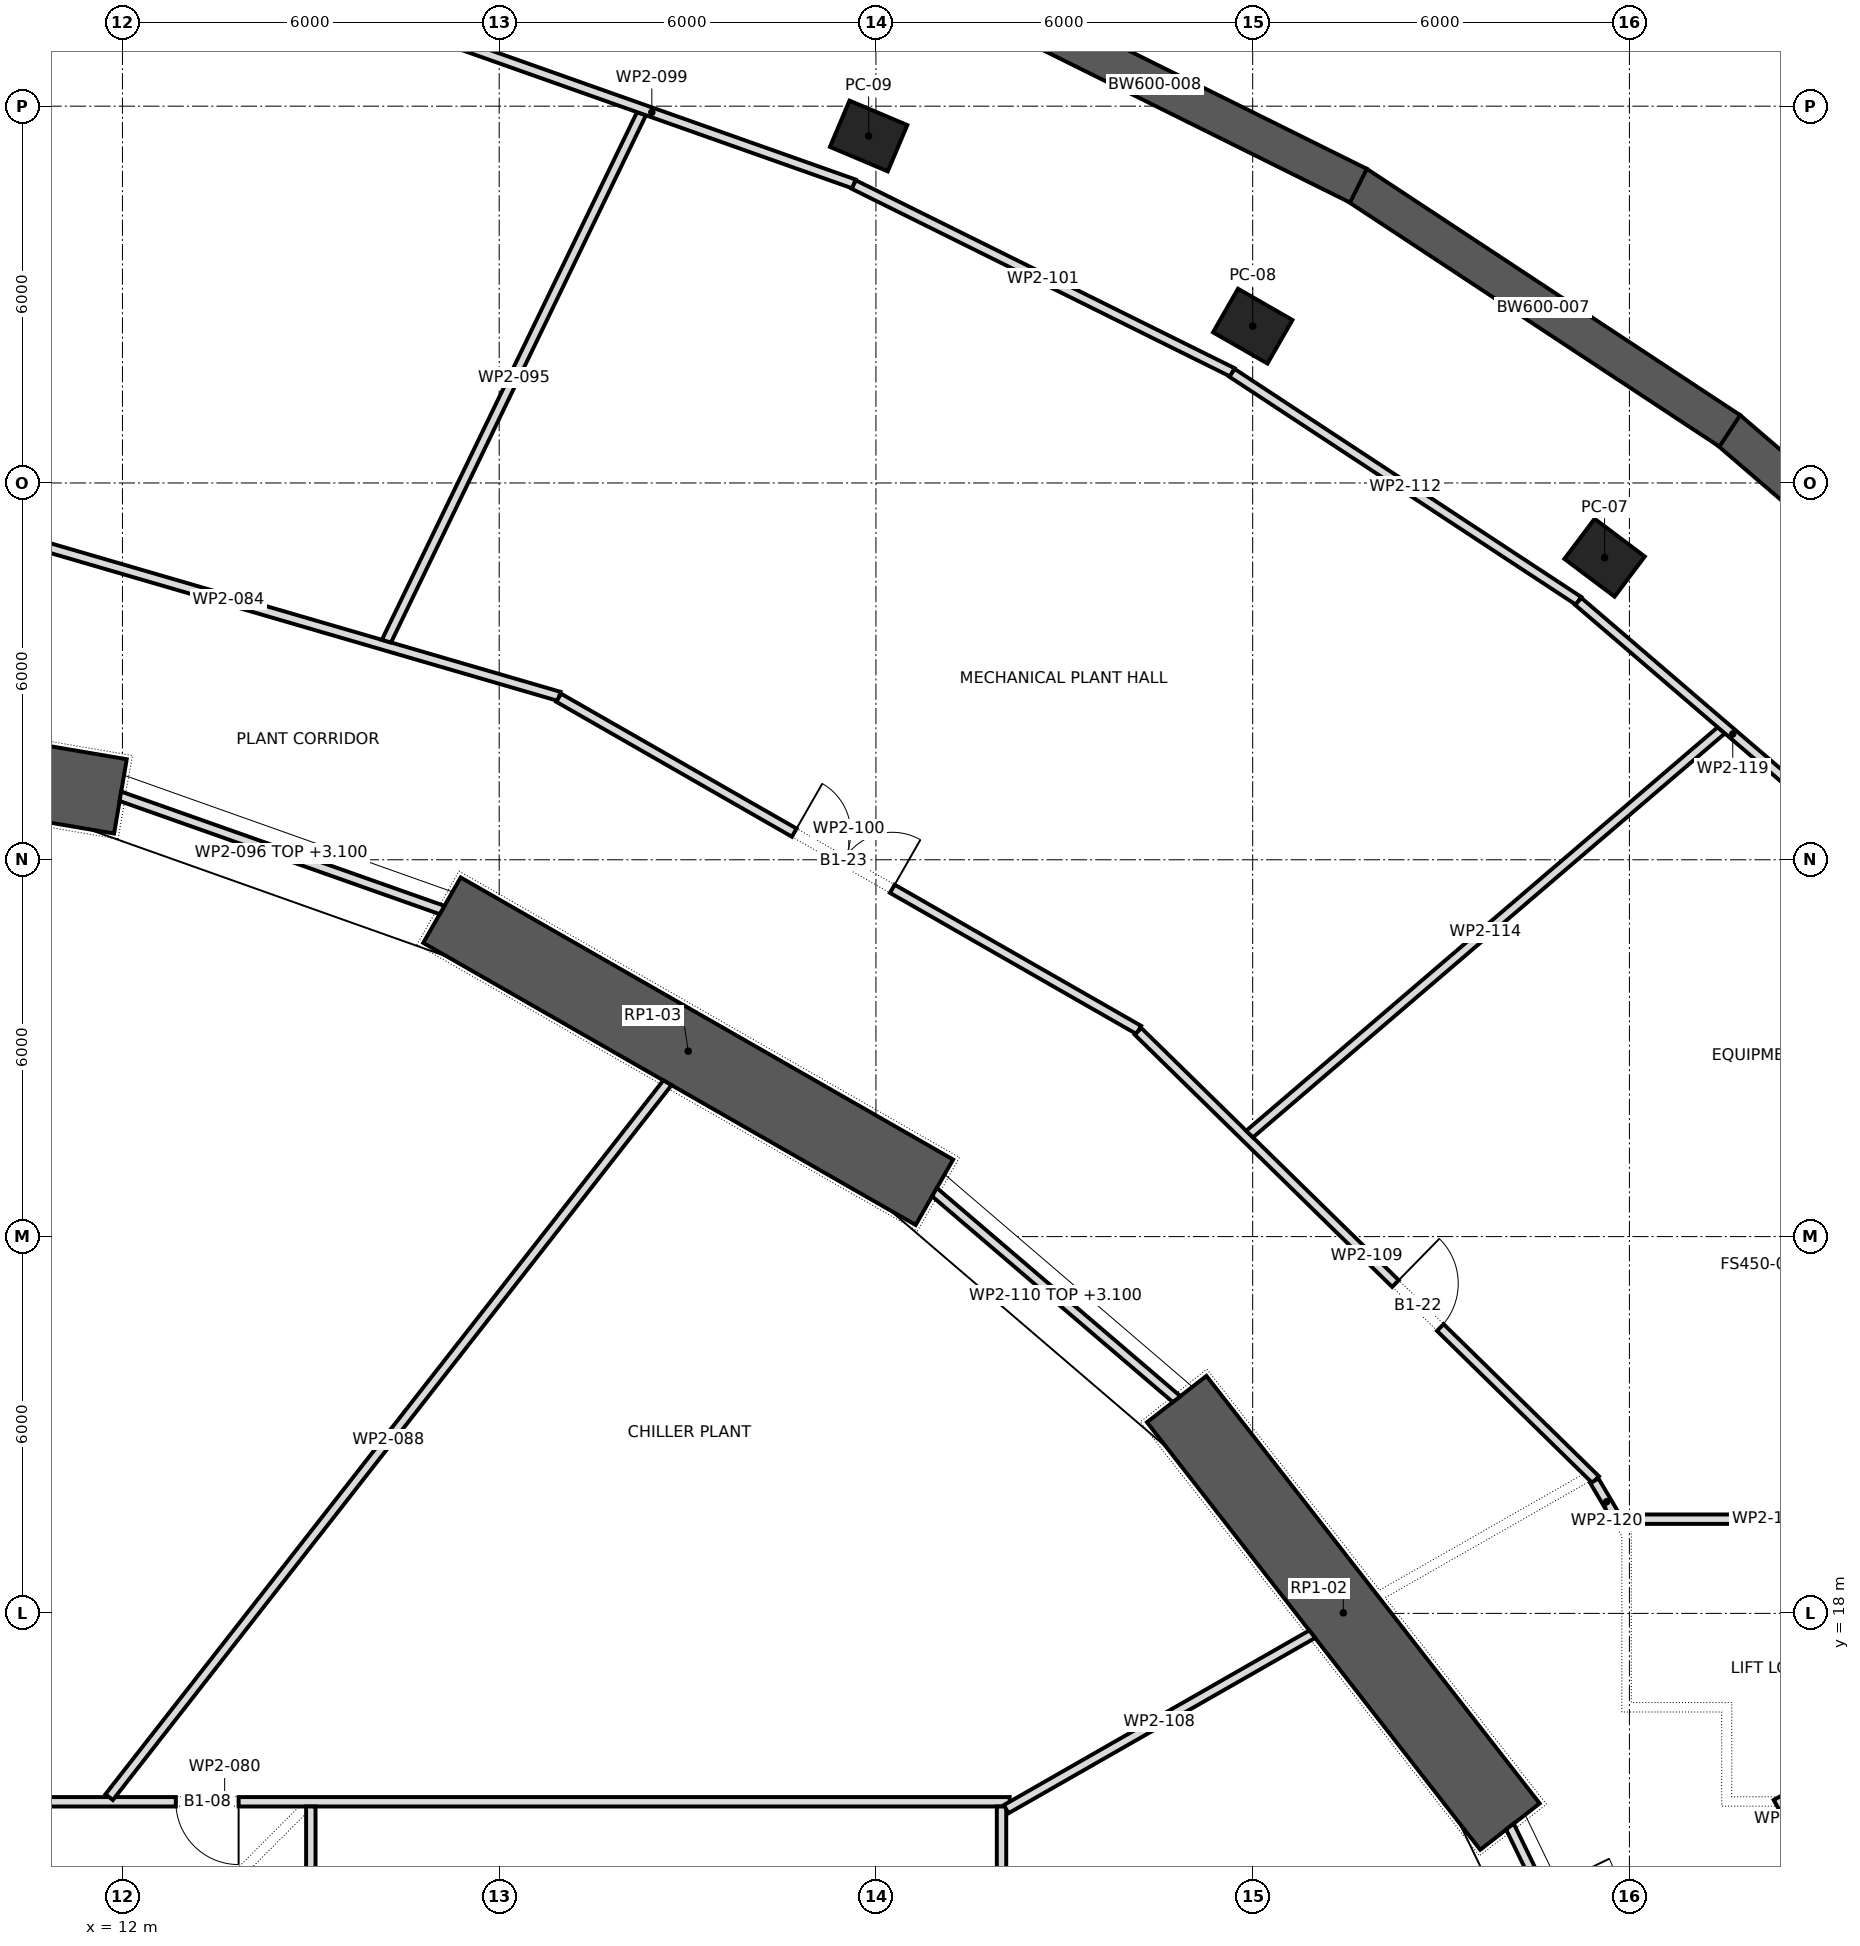
"""IFC4 building model, lengths in metres.
Left out: names, types, materials, properties, quantities, classifications, styles, units other than length and angle.
Written with IfcOpenShell. Run it as: python <this file> out.ifc"""

import sys

from ifc_helpers import new_model, si_unit, direction, frame, frame_2d, origin, origin_2d, place, context, subcontext, project, spatial, polyline, rectangle, outline, extrude, element, fill, save


model = new_model("IFC4")
c1 = context("Model", 3, precision=1e-05, world=origin(), true_north=direction((0.0, 1.0)))
c2 = subcontext(c1, "Body", "Model", "MODEL_VIEW")
j1 = project(units=[si_unit("LENGTHUNIT", "METRE"), si_unit("PLANEANGLEUNIT", "RADIAN")], contexts=[c1])
p1 = place(None, origin())
s1 = spatial("IfcSite", under=j1, at=p1, CompositionType="ELEMENT")
p2 = place(p1, origin())
s2 = spatial("IfcBuilding", under=s1, at=p2, CompositionType="ELEMENT")
p3 = place(p2, frame((0.0, 0.0, -4.0)))
s3 = spatial("IfcBuildingStorey", under=s2, at=p3, CompositionType="ELEMENT", Elevation=-4.0)
for number, where, z_axis, x_axis in (
    (1, (35.605, 34.81, 0.0), (0.0, 0.0, 1.0), (-0.799, 0.601, 0.0)),
    (2, (30.001, 38.497, 0.0), (0.0, 0.0, 1.0), (-0.868, 0.497, 0.0)),
    (3, (23.884, 41.525, 0.0), (0.0, 0.0, 1.0), (-0.921, 0.389, 0.0)),
):
    element("IfcColumn", number, at=place(p3, frame(where, z_axis=z_axis, x_axis=x_axis)), inside=s3, PredefinedType="COLUMN", context=c2, shape_type="SweptSolid", body=[
        extrude(rectangle(XDim=1.0, YDim=0.8, at=origin_2d()), origin(), (0.0, 0.0, 1.0), 4.0),
    ])
p4 = place(p3, frame((34.097, 14.605, 0.0), z_axis=(0.0, 0.0, 1.0), x_axis=(-0.614825322247, 0.788663314174, 0.0)))
e4 = element("IfcWall", 4, at=p4, inside=s3, PredefinedType="SHEAR", context=c2, shape_type="SweptSolid", body=[
    extrude(rectangle(XDim=8.632, YDim=1.2, at=frame_2d((4.316, 0.0))), origin(), (0.0, 0.0, 1.0), 4.0),
])
p5 = place(p3, frame((24.931, 24.706, 0.0), z_axis=(0.0, 0.0, 1.0), x_axis=(-0.867760656864, 0.496982336103, 0.0)))
e5 = element("IfcWall", 5, at=p5, inside=s3, PredefinedType="SHEAR", context=c2, shape_type="SweptSolid", body=[
    extrude(rectangle(XDim=9.038, YDim=1.2, at=frame_2d((4.519, 0.0))), origin(), (0.0, 0.0, 1.0), 4.0),
])
p6 = place(p3, frame((11.967, 31.009, 0.0), z_axis=(0.0, 0.0, 1.0), x_axis=(-0.985776286846, 0.168062822456, 0.0)))
e6 = element("IfcWall", 6, at=p6, inside=s3, PredefinedType="SHEAR", context=c2, shape_type="SweptSolid", body=[
    extrude(rectangle(XDim=9.312, YDim=1.2, at=frame_2d((4.656, 0.0))), origin(), (0.0, 0.0, 1.0), 4.0),
])
p7 = place(p3, frame((42.87, 32.295, 0.0), z_axis=(0.0, 0.0, 1.0), x_axis=(-0.758319142722, 0.65188348482, 0.0)))
e7 = element("IfcWall", 7, at=p7, inside=s3, PredefinedType="SOLIDWALL", context=c2, shape_type="SweptSolid", body=[
    extrude(rectangle(XDim=6.991, YDim=0.6, at=frame_2d((3.496, 0.0))), origin(), (0.0, 0.0, 1.0), 4.0),
])
p8 = place(p3, frame((37.599, 36.83, 0.0), z_axis=(0.0, 0.0, 1.0), x_axis=(-0.834745196239, 0.550636411215, 0.0)))
e8 = element("IfcWall", 8, at=p8, inside=s3, PredefinedType="SOLIDWALL", context=c2, shape_type="SweptSolid", body=[
    extrude(rectangle(XDim=7.124, YDim=0.6, at=frame_2d((3.562, 0.0))), origin(), (0.0, 0.0, 1.0), 4.0),
])
p9 = place(p3, frame((31.684, 40.734, 0.0), z_axis=(0.0, 0.0, 1.0), x_axis=(-0.895750986496, 0.44455614965, 0.0)))
e9 = element("IfcWall", 9, at=p9, inside=s3, PredefinedType="SOLIDWALL", context=c2, shape_type="SweptSolid", body=[
    extrude(rectangle(XDim=7.245, YDim=0.6, at=frame_2d((3.623, 0.0))), origin(), (0.0, 0.0, 1.0), 4.0),
])
p10 = place(p3, frame((1.125, 15.0, 0.0), z_axis=(0.0, 0.0, 1.0), x_axis=(1.0, 0.0, 0.0)))
e10 = element("IfcWall", 10, at=p10, inside=s3, PredefinedType="PARTITIONING", context=c2, shape_type="SweptSolid", body=[
    extrude(rectangle(XDim=25.005, YDim=0.15, at=frame_2d((12.502, 0.0))), origin(), (0.0, 0.0, 1.0), 3.55),
])
p11 = place(p10, frame((11.725, 0.0, 0.0)))
e11 = element("IfcOpeningElement", 11, at=p11, cuts=e10, PredefinedType="OPENING", context=c2, shape_type="SweptSolid", body=[
    extrude(rectangle(XDim=1.0, YDim=2.1, at=frame_2d((0.5, 1.05))), frame((0.0, 0.087, 0.0), z_axis=(0.0, -1.0, 0.0), x_axis=(1.0, 0.0, 0.0)), (0.0, 0.0, 1.0), 0.174),
])
p12 = place(p10, frame((4.444, 0.0, 0.0)))
e12 = element("IfcOpeningElement", 12, at=p12, cuts=e10, PredefinedType="OPENING", context=c2, shape_type="SweptSolid", body=[
    extrude(rectangle(XDim=1.8, YDim=2.1, at=frame_2d((0.9, 1.05))), frame((0.0, 0.087, 0.0), z_axis=(0.0, -1.0, 0.0), x_axis=(1.0, 0.0, 0.0)), (0.0, 0.0, 1.0), 0.174),
])
p13 = place(p3, frame((8.416, 35.672, 0.0), z_axis=(0.0, 0.0, 1.0), x_axis=(0.960099578905, -0.279658360479, 0.0)))
e13 = element("IfcWall", 13, at=p13, inside=s3, PredefinedType="PARTITIONING", context=c2, shape_type="SweptSolid", body=[
    extrude(rectangle(XDim=10.977, YDim=0.15, at=frame_2d((5.489, 0.0))), origin(), (0.0, 0.0, 1.0), 3.55),
])
p14 = place(p3, frame((11.788, 15.074, 0.0), z_axis=(0.0, 0.0, 1.0), x_axis=(0.615848120598, 0.787864894735, 0.0)))
e14 = element("IfcWall", 14, at=p14, inside=s3, PredefinedType="PARTITIONING", context=c2, shape_type="SweptSolid", body=[
    extrude(outline(polyline([(0.0, -0.075), (14.449, -0.075), (14.428, 0.075), (0.0, 0.075), (0.0, -0.075)])), origin(), (0.0, 0.0, 1.0), 3.55),
])
p15 = place(p3, frame((15.0, -14.925, 0.0), z_axis=(0.0, 0.0, 1.0), x_axis=(0.0, 1.0, 0.0)))
e15 = element("IfcWall", 15, at=p15, inside=s3, PredefinedType="PARTITIONING", context=c2, shape_type="SweptSolid", body=[
    extrude(rectangle(XDim=29.85, YDim=0.15, at=frame_2d((14.925, 0.0))), origin(), (0.0, 0.0, 1.0), 3.55),
])
p16 = place(p15, frame((25.66, 0.0, 0.0)))
e16 = element("IfcOpeningElement", 16, at=p16, cuts=e15, PredefinedType="OPENING", context=c2, shape_type="SweptSolid", body=[
    extrude(rectangle(XDim=1.0, YDim=2.1, at=frame_2d((0.5, 1.05))), frame((0.0, 0.087, 0.0), z_axis=(0.0, -1.0, 0.0), x_axis=(1.0, 0.0, 0.0)), (0.0, 0.0, 1.0), 0.174),
])
p17 = place(p15, frame((3.19, 0.0, 0.0)))
e17 = element("IfcOpeningElement", 17, at=p17, cuts=e15, PredefinedType="OPENING", context=c2, shape_type="SweptSolid", body=[
    extrude(rectangle(XDim=1.0, YDim=2.1, at=frame_2d((0.5, 1.05))), frame((0.0, 0.087, 0.0), z_axis=(0.0, -1.0, 0.0), x_axis=(1.0, 0.0, 0.0)), (0.0, 0.0, 1.0), 0.174),
])
p18 = place(p15, frame((13.725, 0.0, 0.0)))
e18 = element("IfcOpeningElement", 18, at=p18, cuts=e15, PredefinedType="OPENING", context=c2, shape_type="SweptSolid", body=[
    extrude(rectangle(XDim=2.4, YDim=2.1, at=frame_2d((1.2, 1.05))), frame((0.0, 0.087, 0.0), z_axis=(0.0, -1.0, 0.0), x_axis=(1.0, 0.0, 0.0)), (0.0, 0.0, 1.0), 0.174),
])
p19 = place(p3, frame((16.204, 33.481, 0.0), z_axis=(0.0, 0.0, 1.0), x_axis=(0.435389941519, 0.90024196682, 0.0)))
e19 = element("IfcWall", 19, at=p19, inside=s3, PredefinedType="PARTITIONING", context=c2, shape_type="SweptSolid", body=[
    extrude(outline(polyline([(0.013, -0.075), (9.339, -0.075), (9.323, 0.075), (-0.013, 0.075), (0.013, -0.075)])), origin(), (0.0, 0.0, 1.0), 3.55),
])
p20 = place(p3, frame((17.091, 29.2, 0.0), z_axis=(0.0, 0.0, 1.0), x_axis=(-0.942814385805, 0.333318217204, 0.0)))
e20 = element("IfcWall", 20, at=p20, inside=s3, PredefinedType="PARTITIONING", context=c2, shape_type="SweptSolid", body=[
    extrude(outline(polyline([(-0.014, -0.075), (5.448, -0.075), (5.422, 0.075), (0.014, 0.075), (-0.014, -0.075)])), origin(), (0.0, 0.0, 1.0), 3.1),
])
p21 = place(p3, frame((17.211, 43.042, 0.0), z_axis=(0.0, 0.0, 1.0), x_axis=(0.94266330093, -0.333745263757, 0.0)))
e21 = element("IfcWall", 21, at=p21, inside=s3, PredefinedType="PARTITIONING", context=c2, shape_type="SweptSolid", body=[
    extrude(rectangle(XDim=6.832, YDim=0.15, at=frame_2d((3.416, 0.0))), origin(), (0.0, 0.0, 1.0), 3.55),
])
p22 = place(p3, frame((18.948, 32.58, 0.0), z_axis=(0.0, 0.0, 1.0), x_axis=(0.867835024459, -0.496852463336, 0.0)))
e22 = element("IfcWall", 22, at=p22, inside=s3, PredefinedType="PARTITIONING", context=c2, shape_type="SweptSolid", body=[
    extrude(rectangle(XDim=10.647, YDim=0.15, at=frame_2d((5.323, 0.0))), origin(), (0.0, 0.0, 1.0), 3.55),
])
p23 = place(p22, frame((4.323, 0.0, 0.0)))
e23 = element("IfcOpeningElement", 23, at=p23, cuts=e22, PredefinedType="OPENING", context=c2, shape_type="SweptSolid", body=[
    extrude(rectangle(XDim=1.8, YDim=2.1, at=frame_2d((0.9, 1.05))), frame((0.0, 0.087, 0.0), z_axis=(0.0, -1.0, 0.0), x_axis=(1.0, 0.0, 0.0)), (0.0, 0.0, 1.0), 0.174),
])
p24 = place(p3, frame((23.646, 40.752, 0.0), z_axis=(0.0, 0.0, 1.0), x_axis=(0.895909442692, -0.444236727991, 0.0)))
e24 = element("IfcWall", 24, at=p24, inside=s3, PredefinedType="PARTITIONING", context=c2, shape_type="SweptSolid", body=[
    extrude(rectangle(XDim=6.731, YDim=0.15, at=frame_2d((3.365, 0.0))), origin(), (0.0, 0.0, 1.0), 3.55),
])
p25 = place(p3, frame((26.0, 7.574, 0.0), z_axis=(0.0, 0.0, 1.0), x_axis=(0.0, 1.0, 0.0)))
e25 = element("IfcWall", 25, at=p25, inside=s3, PredefinedType="PARTITIONING", context=c2, shape_type="SweptSolid", body=[
    extrude(rectangle(XDim=7.351, YDim=0.15, at=frame_2d((3.676, 0.0))), origin(), (0.0, 0.0, 1.0), 3.55),
])
p26 = place(p3, frame((26.074, 14.882, 0.0), z_axis=(0.0, 0.0, 1.0), x_axis=(0.868133416031, 0.496330909746, 0.0)))
e26 = element("IfcWall", 26, at=p26, inside=s3, PredefinedType="PARTITIONING", context=c2, shape_type="SweptSolid", body=[
    extrude(outline(polyline([(0.0, -0.075), (5.626, -0.075), (5.604, 0.075), (0.0, 0.075), (0.0, -0.075)])), origin(), (0.0, 0.0, 1.0), 3.55),
])
p27 = place(p3, frame((28.174, 27.268, 0.0), z_axis=(0.0, 0.0, 1.0), x_axis=(0.714427427428, -0.699709547554, 0.0)))
e27 = element("IfcWall", 27, at=p27, inside=s3, PredefinedType="PARTITIONING", context=c2, shape_type="SweptSolid", body=[
    extrude(rectangle(XDim=10.202, YDim=0.15, at=frame_2d((5.101, 0.0))), origin(), (0.0, 0.0, 1.0), 3.55),
])
p28 = place(p27, frame((5.74, 0.0, 0.0)))
e28 = element("IfcOpeningElement", 28, at=p28, cuts=e27, PredefinedType="OPENING", context=c2, shape_type="SweptSolid", body=[
    extrude(rectangle(XDim=1.0, YDim=2.1, at=frame_2d((0.5, 1.05))), frame((0.0, 0.087, 0.0), z_axis=(0.0, -1.0, 0.0), x_axis=(1.0, 0.0, 0.0)), (0.0, 0.0, 1.0), 0.174),
])
p29 = place(p3, frame((28.789, 21.411, 0.0), z_axis=(0.0, 0.0, 1.0), x_axis=(-0.760084552743, 0.649824185978, 0.0)))
e29 = element("IfcWall", 29, at=p29, inside=s3, PredefinedType="PARTITIONING", context=c2, shape_type="SweptSolid", body=[
    extrude(outline(polyline([(-0.015, -0.075), (5.089, -0.075), (5.061, 0.075), (0.015, 0.075), (-0.015, -0.075)])), origin(), (0.0, 0.0, 1.0), 3.1),
])
p30 = place(p3, frame((29.671, 37.753, 0.0), z_axis=(0.0, 0.0, 1.0), x_axis=(0.83553583791, -0.549435950378, 0.0)))
e30 = element("IfcWall", 30, at=p30, inside=s3, PredefinedType="PARTITIONING", context=c2, shape_type="SweptSolid", body=[
    extrude(rectangle(XDim=6.606, YDim=0.15, at=frame_2d((3.303, 0.0))), origin(), (0.0, 0.0, 1.0), 3.55),
])
p31 = place(p3, frame((29.95, 25.632, 0.0), z_axis=(0.0, 0.0, 1.0), x_axis=(0.759739094859, 0.650228042876, 0.0)))
e31 = element("IfcWall", 31, at=p31, inside=s3, PredefinedType="PARTITIONING", context=c2, shape_type="SweptSolid", body=[
    extrude(outline(polyline([(0.007, -0.075), (9.901, -0.075), (9.878, 0.075), (-0.007, 0.075), (0.007, -0.075)])), origin(), (0.0, 0.0, 1.0), 3.55),
])
p32 = place(p3, frame((34.097, 14.606, 0.0), z_axis=(0.0, 0.0, 1.0), x_axis=(0.436936398764, -0.899492403212, 0.0)))
e32 = element("IfcWall", 32, at=p32, inside=s3, PredefinedType="PARTITIONING", context=c2, shape_type="SweptSolid", body=[
    extrude(outline(polyline([(0.016, -0.075), (4.681, -0.075), (4.715, 0.075), (-0.016, 0.075), (0.016, -0.075)])), origin(), (0.0, 0.0, 1.0), 3.1),
])
p33 = place(p32, frame((1.152, 0.0, 0.0)))
e33 = element("IfcOpeningElement", 33, at=p33, cuts=e32, PredefinedType="OPENING", context=c2, shape_type="SweptSolid", body=[
    extrude(rectangle(XDim=2.4, YDim=2.1, at=frame_2d((1.2, 1.05))), frame((0.0, 0.087, 0.0), z_axis=(0.0, -1.0, 0.0), x_axis=(1.0, 0.0, 0.0)), (0.0, 0.0, 1.0), 0.174),
])
p34 = place(p3, frame((35.185, 34.114, 0.0), z_axis=(0.0, 0.0, 1.0), x_axis=(0.759033312601, -0.651051787773, 0.0)))
e34 = element("IfcWall", 34, at=p34, inside=s3, PredefinedType="PARTITIONING", context=c2, shape_type="SweptSolid", body=[
    extrude(rectangle(XDim=6.484, YDim=0.15, at=frame_2d((3.242, 0.0))), origin(), (0.0, 0.0, 1.0), 3.55),
])
p35 = place(p3, frame((35.443, 20.111, 0.0), z_axis=(0.0, 0.0, 1.0), x_axis=(0.507767925719, -0.861493896444, 0.0)))
e35 = element("IfcWall", 35, at=p35, inside=s3, PredefinedType="PARTITIONING", context=c2, shape_type="SweptSolid", body=[
    extrude(rectangle(XDim=0.77, YDim=0.15, at=frame_2d((0.385, 0.0))), origin(), (0.0, 0.0, 1.0), 3.55),
])
p36 = place(p3, frame((35.889, 19.5, 0.0), z_axis=(0.0, 0.0, 1.0), x_axis=(1.0, 0.0, 0.0)))
e36 = element("IfcWall", 36, at=p36, inside=s3, PredefinedType="PARTITIONING", context=c2, shape_type="SweptSolid", body=[
    extrude(outline(polyline([(0.045, -0.075), (4.636, -0.075), (4.636, 0.075), (-0.045, 0.075), (0.045, -0.075)])), origin(), (0.0, 0.0, 1.0), 3.55),
])
p37 = place(p3, frame((38.363, 15.065, 0.0), z_axis=(0.0, 0.0, 1.0), x_axis=(0.49173071, -0.870747327784, 0.0)))
e37 = element("IfcWall", 37, at=p37, inside=s3, PredefinedType="PARTITIONING", context=c2, shape_type="SweptSolid", body=[
    extrude(outline(polyline([(0.0, -0.075), (0.743, -0.075), (0.833, 0.075), (0.0, 0.075), (0.0, -0.075)])), origin(), (0.0, 0.0, 1.0), 3.55),
])
p38 = place(p11, frame((1.0, 0.0, 0.0), z_axis=(0.0, 0.0, 1.0), x_axis=(-1.0, 0.0, 0.0)))
e38 = element("IfcDoor", 38, at=p38, inside=s3, OperationType="SINGLE_SWING_RIGHT", PredefinedType="DOOR", context=c2, shape_type="SweptSolid", body=[
    extrude(rectangle(XDim=1.0, YDim=2.1, at=frame_2d((0.5, 1.05))), frame((0.0, 0.025, 0.0), z_axis=(0.0, -1.0, 0.0), x_axis=(1.0, 0.0, 0.0)), (0.0, 0.0, 1.0), 0.05),
])
fill(e11, e38)
p39 = place(p28, origin())
e39 = element("IfcDoor", 39, at=p39, inside=s3, OperationType="SINGLE_SWING_RIGHT", PredefinedType="DOOR", context=c2, shape_type="SweptSolid", body=[
    extrude(rectangle(XDim=1.0, YDim=2.1, at=frame_2d((0.5, 1.05))), frame((0.0, 0.025, 0.0), z_axis=(0.0, -1.0, 0.0), x_axis=(1.0, 0.0, 0.0)), (0.0, 0.0, 1.0), 0.05),
])
fill(e28, e39)
p40 = place(p23, origin())
e40 = element("IfcDoor", 40, at=p40, inside=s3, OperationType="DOUBLE_DOOR_SINGLE_SWING", PredefinedType="DOOR", context=c2, shape_type="SweptSolid", body=[
    extrude(rectangle(XDim=1.8, YDim=2.1, at=frame_2d((0.9, 1.05))), frame((0.0, 0.025, 0.0), z_axis=(0.0, -1.0, 0.0), x_axis=(1.0, 0.0, 0.0)), (0.0, 0.0, 1.0), 0.05),
])
fill(e23, e40)
save(model, sys.argv[1])
